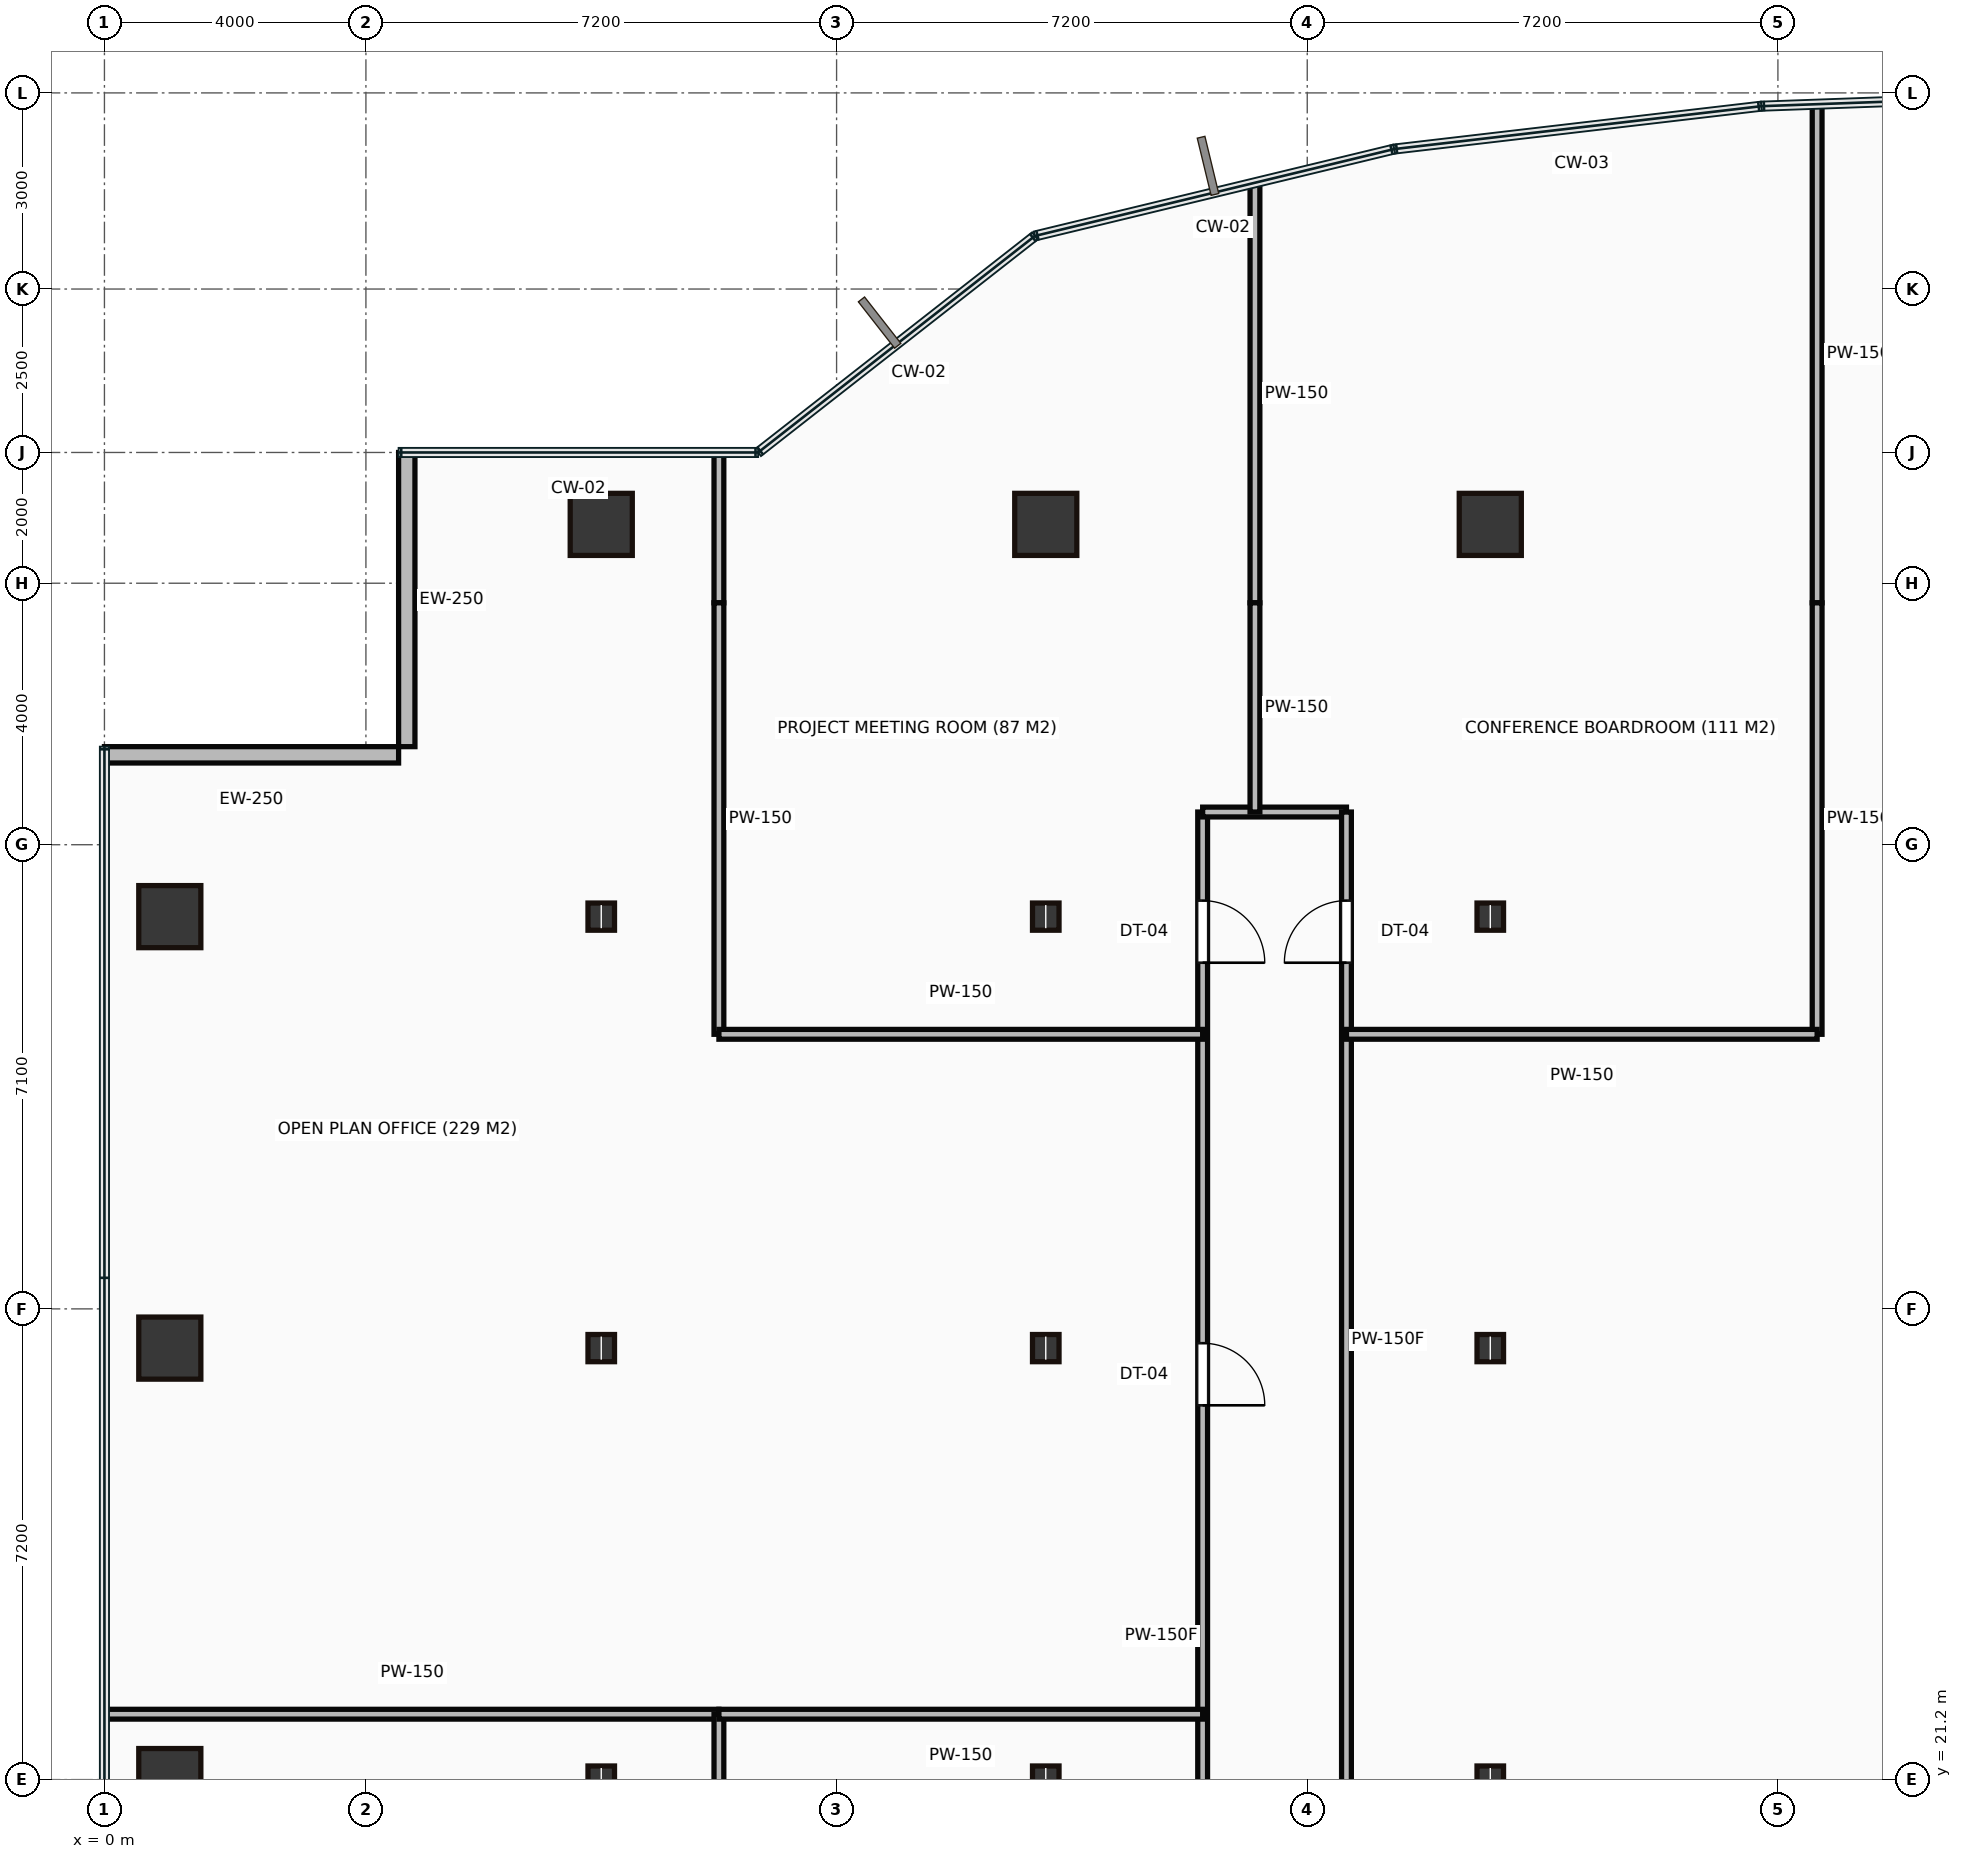
"""IFC4 building model, lengths in metres.
Left out: names, types, materials, properties, quantities, classifications, styles, units other than length and angle.
Written with IfcOpenShell. Run it as: python <this file> out.ifc"""

import sys

from ifc_helpers import new_model, si_unit, direction, frame, frame_2d, origin, origin_2d, place, context, subcontext, project, spatial, rectangle, hollow_rectangle, i_section, extrude, source, transform, mapped, element, fill, save


model = new_model("IFC4")
c1 = context("Model", 3, precision=1e-05, world=origin(), true_north=direction((0.0, 1.0)))
c2 = subcontext(c1, "Body", "Model", "MODEL_VIEW")
j1 = project(units=[si_unit("LENGTHUNIT", "METRE"), si_unit("PLANEANGLEUNIT", "RADIAN")], contexts=[c1])
p1 = place(None, origin())
s1 = spatial("IfcSite", under=j1, at=p1, CompositionType="ELEMENT")
p2 = place(p1, origin())
s2 = spatial("IfcBuilding", under=s1, at=p2, CompositionType="ELEMENT")
p3 = place(p2, frame((0.0, 0.0, 58.05)))
s3 = spatial("IfcBuildingStorey", under=s2, at=p3, CompositionType="ELEMENT", Elevation=58.05)
m1 = source(origin(), c2, "Body", "SweptSolid", [
    extrude(hollow_rectangle(XDim=0.95, YDim=0.95, WallThickness=0.045, at=origin_2d()), origin(), (0.0, 0.0, 1.0), 3.65),
])
for number, where, z_axis, x_axis in (
    (1, (1.0, 21.2, 0.0), (0.0, 0.0, 1.0), (1.0, 0.0, 0.0)),
    (2, (1.0, 27.8, 0.0), (0.0, 0.0, 1.0), (1.0, 0.0, 0.0)),
    (3, (1.0, 34.4, 0.0), (0.0, 0.0, 1.0), (1.0, 0.0, 0.0)),
):
    element("IfcColumn", number, at=place(p3, frame(where, z_axis=z_axis, x_axis=x_axis)), inside=s3, PredefinedType="COLUMN", context=c2, shape_type="MappedRepresentation", body=[
        mapped(m1, transform((0.0, 0.0, 0.0))),
    ])
m2 = source(origin(), c2, "Body", "SweptSolid", [
    extrude(i_section(OverallWidth=0.406, OverallDepth=0.416, WebThickness=0.03, FlangeThickness=0.048, at=origin_2d()), origin(), (0.0, 0.0, 1.0), 3.65),
])
for number, where, z_axis, x_axis in (
    (4, (7.6, 21.2, 0.0), (0.0, 0.0, 1.0), (1.0, 0.0, 0.0)),
    (5, (7.6, 27.8, 0.0), (0.0, 0.0, 1.0), (1.0, 0.0, 0.0)),
    (6, (7.6, 34.4, 0.0), (0.0, 0.0, 1.0), (1.0, 0.0, 0.0)),
):
    element("IfcColumn", number, at=place(p3, frame(where, z_axis=z_axis, x_axis=x_axis)), inside=s3, PredefinedType="COLUMN", context=c2, shape_type="MappedRepresentation", body=[
        mapped(m2, transform((0.0, 0.0, 0.0))),
    ])
p4 = place(p3, frame((7.6, 40.4, 0.0), z_axis=(0.0, 0.0, 1.0), x_axis=(1.0, 0.0, 0.0)))
e7 = element("IfcColumn", 7, at=p4, inside=s3, PredefinedType="COLUMN", context=c2, shape_type="MappedRepresentation", body=[
    mapped(m1, transform((0.0, 0.0, 0.0))),
])
for number, where, z_axis, x_axis in (
    (8, (14.4, 21.2, 0.0), (0.0, 0.0, 1.0), (1.0, 0.0, 0.0)),
    (9, (14.4, 27.8, 0.0), (0.0, 0.0, 1.0), (1.0, 0.0, 0.0)),
    (10, (14.4, 34.4, 0.0), (0.0, 0.0, 1.0), (1.0, 0.0, 0.0)),
):
    element("IfcColumn", number, at=place(p3, frame(where, z_axis=z_axis, x_axis=x_axis)), inside=s3, PredefinedType="COLUMN", context=c2, shape_type="MappedRepresentation", body=[
        mapped(m2, transform((0.0, 0.0, 0.0))),
    ])
p5 = place(p3, frame((14.4, 40.4, 0.0), z_axis=(0.0, 0.0, 1.0), x_axis=(1.0, 0.0, 0.0)))
e11 = element("IfcColumn", 11, at=p5, inside=s3, PredefinedType="COLUMN", context=c2, shape_type="MappedRepresentation", body=[
    mapped(m1, transform((0.0, 0.0, 0.0))),
])
for number, where, z_axis, x_axis in (
    (12, (21.2, 21.2, 0.0), (0.0, 0.0, 1.0), (1.0, 0.0, 0.0)),
    (13, (21.2, 27.8, 0.0), (0.0, 0.0, 1.0), (1.0, 0.0, 0.0)),
    (14, (21.2, 34.4, 0.0), (0.0, 0.0, 1.0), (1.0, 0.0, 0.0)),
):
    element("IfcColumn", number, at=place(p3, frame(where, z_axis=z_axis, x_axis=x_axis)), inside=s3, PredefinedType="COLUMN", context=c2, shape_type="MappedRepresentation", body=[
        mapped(m2, transform((0.0, 0.0, 0.0))),
    ])
p6 = place(p3, frame((21.2, 40.4, 0.0), z_axis=(0.0, 0.0, 1.0), x_axis=(1.0, 0.0, 0.0)))
e15 = element("IfcColumn", 15, at=p6, inside=s3, PredefinedType="COLUMN", context=c2, shape_type="MappedRepresentation", body=[
    mapped(m1, transform((0.0, 0.0, 0.0))),
])
m3 = source(origin(), c2, "Body", "SweptSolid", [
    extrude(rectangle(XDim=4.5, YDim=0.25, at=frame_2d((2.25, 0.0))), origin(), (0.0, 0.0, 1.0), 3.4),
])
for number, where, z_axis, x_axis in (
    (16, (4.625, 41.5, 0.0), (0.0, 0.0, 1.0), (0.0, -1.0, 0.0)),
    (17, (4.5, 36.875, 0.0), (0.0, 0.0, 1.0), (-1.0, 0.0, 0.0)),
):
    element("IfcWall", number, at=place(p3, frame(where, z_axis=z_axis, x_axis=x_axis)), inside=s3, PredefinedType="STANDARD", context=c2, shape_type="MappedRepresentation", body=[
        mapped(m3, transform((0.0, 0.0, 0.0))),
    ])
m4 = source(origin(), c2, "Body", "SweptSolid", [
    extrude(rectangle(XDim=16.15, YDim=0.15, at=frame_2d((8.075, 0.0))), origin(), (0.0, 0.0, 1.0), 3.4),
])
p7 = place(p3, frame((16.8, 19.85, 0.0), z_axis=(0.0, 0.0, 1.0), x_axis=(0.0, 1.0, 0.0)))
e18 = element("IfcWall", 18, at=p7, inside=s3, PredefinedType="PARTITIONING", context=c2, shape_type="MappedRepresentation", body=[
    mapped(m4, transform((0.0, 0.0, 0.0))),
])
p8 = place(p7, frame((7.075, 0.0, 0.0)))
e19 = element("IfcOpeningElement", 19, at=p8, cuts=e18, PredefinedType="OPENING", context=c2, shape_type="SweptSolid", body=[
    extrude(rectangle(XDim=0.95, YDim=2.15, at=frame_2d((0.475, 1.075))), frame((0.0, 0.085, 0.0), z_axis=(0.0, -1.0, 0.0), x_axis=(1.0, 0.0, 0.0)), (0.0, 0.0, 1.0), 0.17),
])
p9 = place(p7, frame((13.845, 0.0, 0.0)))
e20 = element("IfcOpeningElement", 20, at=p9, cuts=e18, PredefinedType="OPENING", context=c2, shape_type="SweptSolid", body=[
    extrude(rectangle(XDim=0.95, YDim=2.15, at=frame_2d((0.475, 1.075))), frame((0.0, 0.085, 0.0), z_axis=(0.0, -1.0, 0.0), x_axis=(1.0, 0.0, 0.0)), (0.0, 0.0, 1.0), 0.17),
])
m5 = source(origin(), c2, "Body", "SweptSolid", [
    extrude(rectangle(XDim=2.2, YDim=0.15, at=frame_2d((1.1, 0.0))), origin(), (0.0, 0.0, 1.0), 3.4),
])
p10 = place(p3, frame((16.8, 36.0, 0.0), z_axis=(0.0, 0.0, 1.0), x_axis=(1.0, 0.0, 0.0)))
e21 = element("IfcWall", 21, at=p10, inside=s3, PredefinedType="PARTITIONING", context=c2, shape_type="MappedRepresentation", body=[
    mapped(m5, transform((0.0, 0.0, 0.0))),
])
p11 = place(p3, frame((19.0, 36.0, 0.0), z_axis=(0.0, 0.0, 1.0), x_axis=(0.0, -1.0, 0.0)))
e22 = element("IfcWall", 22, at=p11, inside=s3, PredefinedType="PARTITIONING", context=c2, shape_type="MappedRepresentation", body=[
    mapped(m4, transform((0.0, 0.0, 0.0))),
])
p12 = place(p11, frame((1.355, 0.0, 0.0)))
e23 = element("IfcOpeningElement", 23, at=p12, cuts=e22, PredefinedType="OPENING", context=c2, shape_type="SweptSolid", body=[
    extrude(rectangle(XDim=0.95, YDim=2.15, at=frame_2d((0.475, 1.075))), frame((0.0, 0.085, 0.0), z_axis=(0.0, -1.0, 0.0), x_axis=(1.0, 0.0, 0.0)), (0.0, 0.0, 1.0), 0.17),
])
m6 = source(origin(), c2, "Body", "SweptSolid", [
    extrude(rectangle(XDim=9.38, YDim=0.15, at=frame_2d((4.69, 0.0))), origin(), (0.0, 0.0, 1.0), 3.4),
])
p13 = place(p3, frame((0.02, 22.2, 0.0), z_axis=(0.0, 0.0, 1.0), x_axis=(1.0, 0.0, 0.0)))
e24 = element("IfcWall", 24, at=p13, inside=s3, PredefinedType="PARTITIONING", context=c2, shape_type="MappedRepresentation", body=[
    mapped(m6, transform((0.0, 0.0, 0.0))),
])
m7 = source(origin(), c2, "Body", "SweptSolid", [
    extrude(rectangle(XDim=5.95, YDim=0.15, at=frame_2d((2.975, 0.0))), origin(), (0.0, 0.0, 1.0), 3.4),
])
p14 = place(p3, frame((9.4, 22.2, 0.0), z_axis=(0.0, 0.0, 1.0), x_axis=(0.0, -1.0, 0.0)))
e25 = element("IfcWall", 25, at=p14, inside=s3, PredefinedType="PARTITIONING", context=c2, shape_type="MappedRepresentation", body=[
    mapped(m7, transform((0.0, 0.0, 0.0))),
])
m8 = source(origin(), c2, "Body", "SweptSolid", [
    extrude(rectangle(XDim=7.4, YDim=0.15, at=frame_2d((3.7, 0.0))), origin(), (0.0, 0.0, 1.0), 3.4),
])
p15 = place(p3, frame((16.8, 22.2, 0.0), z_axis=(0.0, 0.0, 1.0), x_axis=(-1.0, 0.0, 0.0)))
e26 = element("IfcWall", 26, at=p15, inside=s3, PredefinedType="PARTITIONING", context=c2, shape_type="MappedRepresentation", body=[
    mapped(m8, transform((0.0, 0.0, 0.0))),
])
m9 = source(origin(), c2, "Body", "SweptSolid", [
    extrude(rectangle(XDim=2.28, YDim=0.15, at=frame_2d((1.14, 0.0))), origin(), (0.0, 0.0, 1.0), 3.4),
])
p16 = place(p3, frame((9.4, 41.48, 0.0), z_axis=(0.0, 0.0, 1.0), x_axis=(0.0, -1.0, 0.0)))
e27 = element("IfcWall", 27, at=p16, inside=s3, PredefinedType="PARTITIONING", context=c2, shape_type="MappedRepresentation", body=[
    mapped(m9, transform((0.0, 0.0, 0.0))),
])
m10 = source(origin(), c2, "Body", "SweptSolid", [
    extrude(rectangle(XDim=6.6, YDim=0.15, at=frame_2d((3.3, 0.0))), origin(), (0.0, 0.0, 1.0), 3.4),
])
p17 = place(p3, frame((9.4, 39.2, 0.0), z_axis=(0.0, 0.0, 1.0), x_axis=(0.0, -1.0, 0.0)))
e28 = element("IfcWall", 28, at=p17, inside=s3, PredefinedType="PARTITIONING", context=c2, shape_type="MappedRepresentation", body=[
    mapped(m10, transform((0.0, 0.0, 0.0))),
])
p18 = place(p3, frame((9.4, 32.6, 0.0), z_axis=(0.0, 0.0, 1.0), x_axis=(1.0, 0.0, 0.0)))
e29 = element("IfcWall", 29, at=p18, inside=s3, PredefinedType="PARTITIONING", context=c2, shape_type="MappedRepresentation", body=[
    mapped(m8, transform((0.0, 0.0, 0.0))),
])
m11 = source(origin(), c2, "Body", "SweptSolid", [
    extrude(rectangle(XDim=6.405, YDim=0.15, at=frame_2d((3.203, 0.0))), origin(), (0.0, 0.0, 1.0), 3.4),
])
p19 = place(p3, frame((17.6, 45.605, 0.0), z_axis=(0.0, 0.0, 1.0), x_axis=(0.0, -1.0, 0.0)))
e30 = element("IfcWall", 30, at=p19, inside=s3, PredefinedType="PARTITIONING", context=c2, shape_type="MappedRepresentation", body=[
    mapped(m11, transform((0.0, 0.0, 0.0))),
])
m12 = source(origin(), c2, "Body", "SweptSolid", [
    extrude(rectangle(XDim=3.2, YDim=0.15, at=frame_2d((1.6, 0.0))), origin(), (0.0, 0.0, 1.0), 3.4),
])
p20 = place(p3, frame((17.6, 39.2, 0.0), z_axis=(0.0, 0.0, 1.0), x_axis=(0.0, -1.0, 0.0)))
e31 = element("IfcWall", 31, at=p20, inside=s3, PredefinedType="PARTITIONING", context=c2, shape_type="MappedRepresentation", body=[
    mapped(m12, transform((0.0, 0.0, 0.0))),
])
m13 = source(origin(), c2, "Body", "SweptSolid", [
    extrude(rectangle(XDim=7.608, YDim=0.15, at=frame_2d((3.804, 0.0))), origin(), (0.0, 0.0, 1.0), 3.4),
])
p21 = place(p3, frame((26.2, 46.808, 0.0), z_axis=(0.0, 0.0, 1.0), x_axis=(0.0, -1.0, 0.0)))
e32 = element("IfcWall", 32, at=p21, inside=s3, PredefinedType="PARTITIONING", context=c2, shape_type="MappedRepresentation", body=[
    mapped(m13, transform((0.0, 0.0, 0.0))),
])
p22 = place(p3, frame((26.2, 39.2, 0.0), z_axis=(0.0, 0.0, 1.0), x_axis=(0.0, -1.0, 0.0)))
e33 = element("IfcWall", 33, at=p22, inside=s3, PredefinedType="PARTITIONING", context=c2, shape_type="MappedRepresentation", body=[
    mapped(m10, transform((0.0, 0.0, 0.0))),
])
m14 = source(origin(), c2, "Body", "SweptSolid", [
    extrude(rectangle(XDim=7.2, YDim=0.15, at=frame_2d((3.6, 0.0))), origin(), (0.0, 0.0, 1.0), 3.4),
])
p23 = place(p3, frame((26.2, 32.6, 0.0), z_axis=(0.0, 0.0, 1.0), x_axis=(-1.0, 0.0, 0.0)))
e34 = element("IfcWall", 34, at=p23, inside=s3, PredefinedType="PARTITIONING", context=c2, shape_type="MappedRepresentation", body=[
    mapped(m14, transform((0.0, 0.0, 0.0))),
])
m15 = source(origin(), c2, "Body", "SweptSolid", [
    extrude(rectangle(XDim=0.95, YDim=2.15, at=frame_2d((0.475, 1.075))), frame((0.0, 0.025, 0.0), z_axis=(0.0, -1.0, 0.0), x_axis=(1.0, 0.0, 0.0)), (0.0, 0.0, 1.0), 0.05),
])
p24 = place(p8, origin())
e35 = element("IfcDoor", 35, at=p24, inside=s3, OperationType="SINGLE_SWING_LEFT", PredefinedType="DOOR", context=c2, shape_type="MappedRepresentation", body=[
    mapped(m15, transform((0.0, 0.0, 0.0))),
])
fill(e19, e35)
p25 = place(p9, origin())
e36 = element("IfcDoor", 36, at=p25, inside=s3, OperationType="SINGLE_SWING_LEFT", PredefinedType="DOOR", context=c2, shape_type="MappedRepresentation", body=[
    mapped(m15, transform((0.0, 0.0, 0.0))),
])
fill(e20, e36)
p26 = place(p12, origin())
e37 = element("IfcDoor", 37, at=p26, inside=s3, OperationType="SINGLE_SWING_RIGHT", PredefinedType="DOOR", context=c2, shape_type="MappedRepresentation", body=[
    mapped(m15, transform((0.0, 0.0, 0.0))),
])
fill(e23, e37)
save(model, sys.argv[1])
